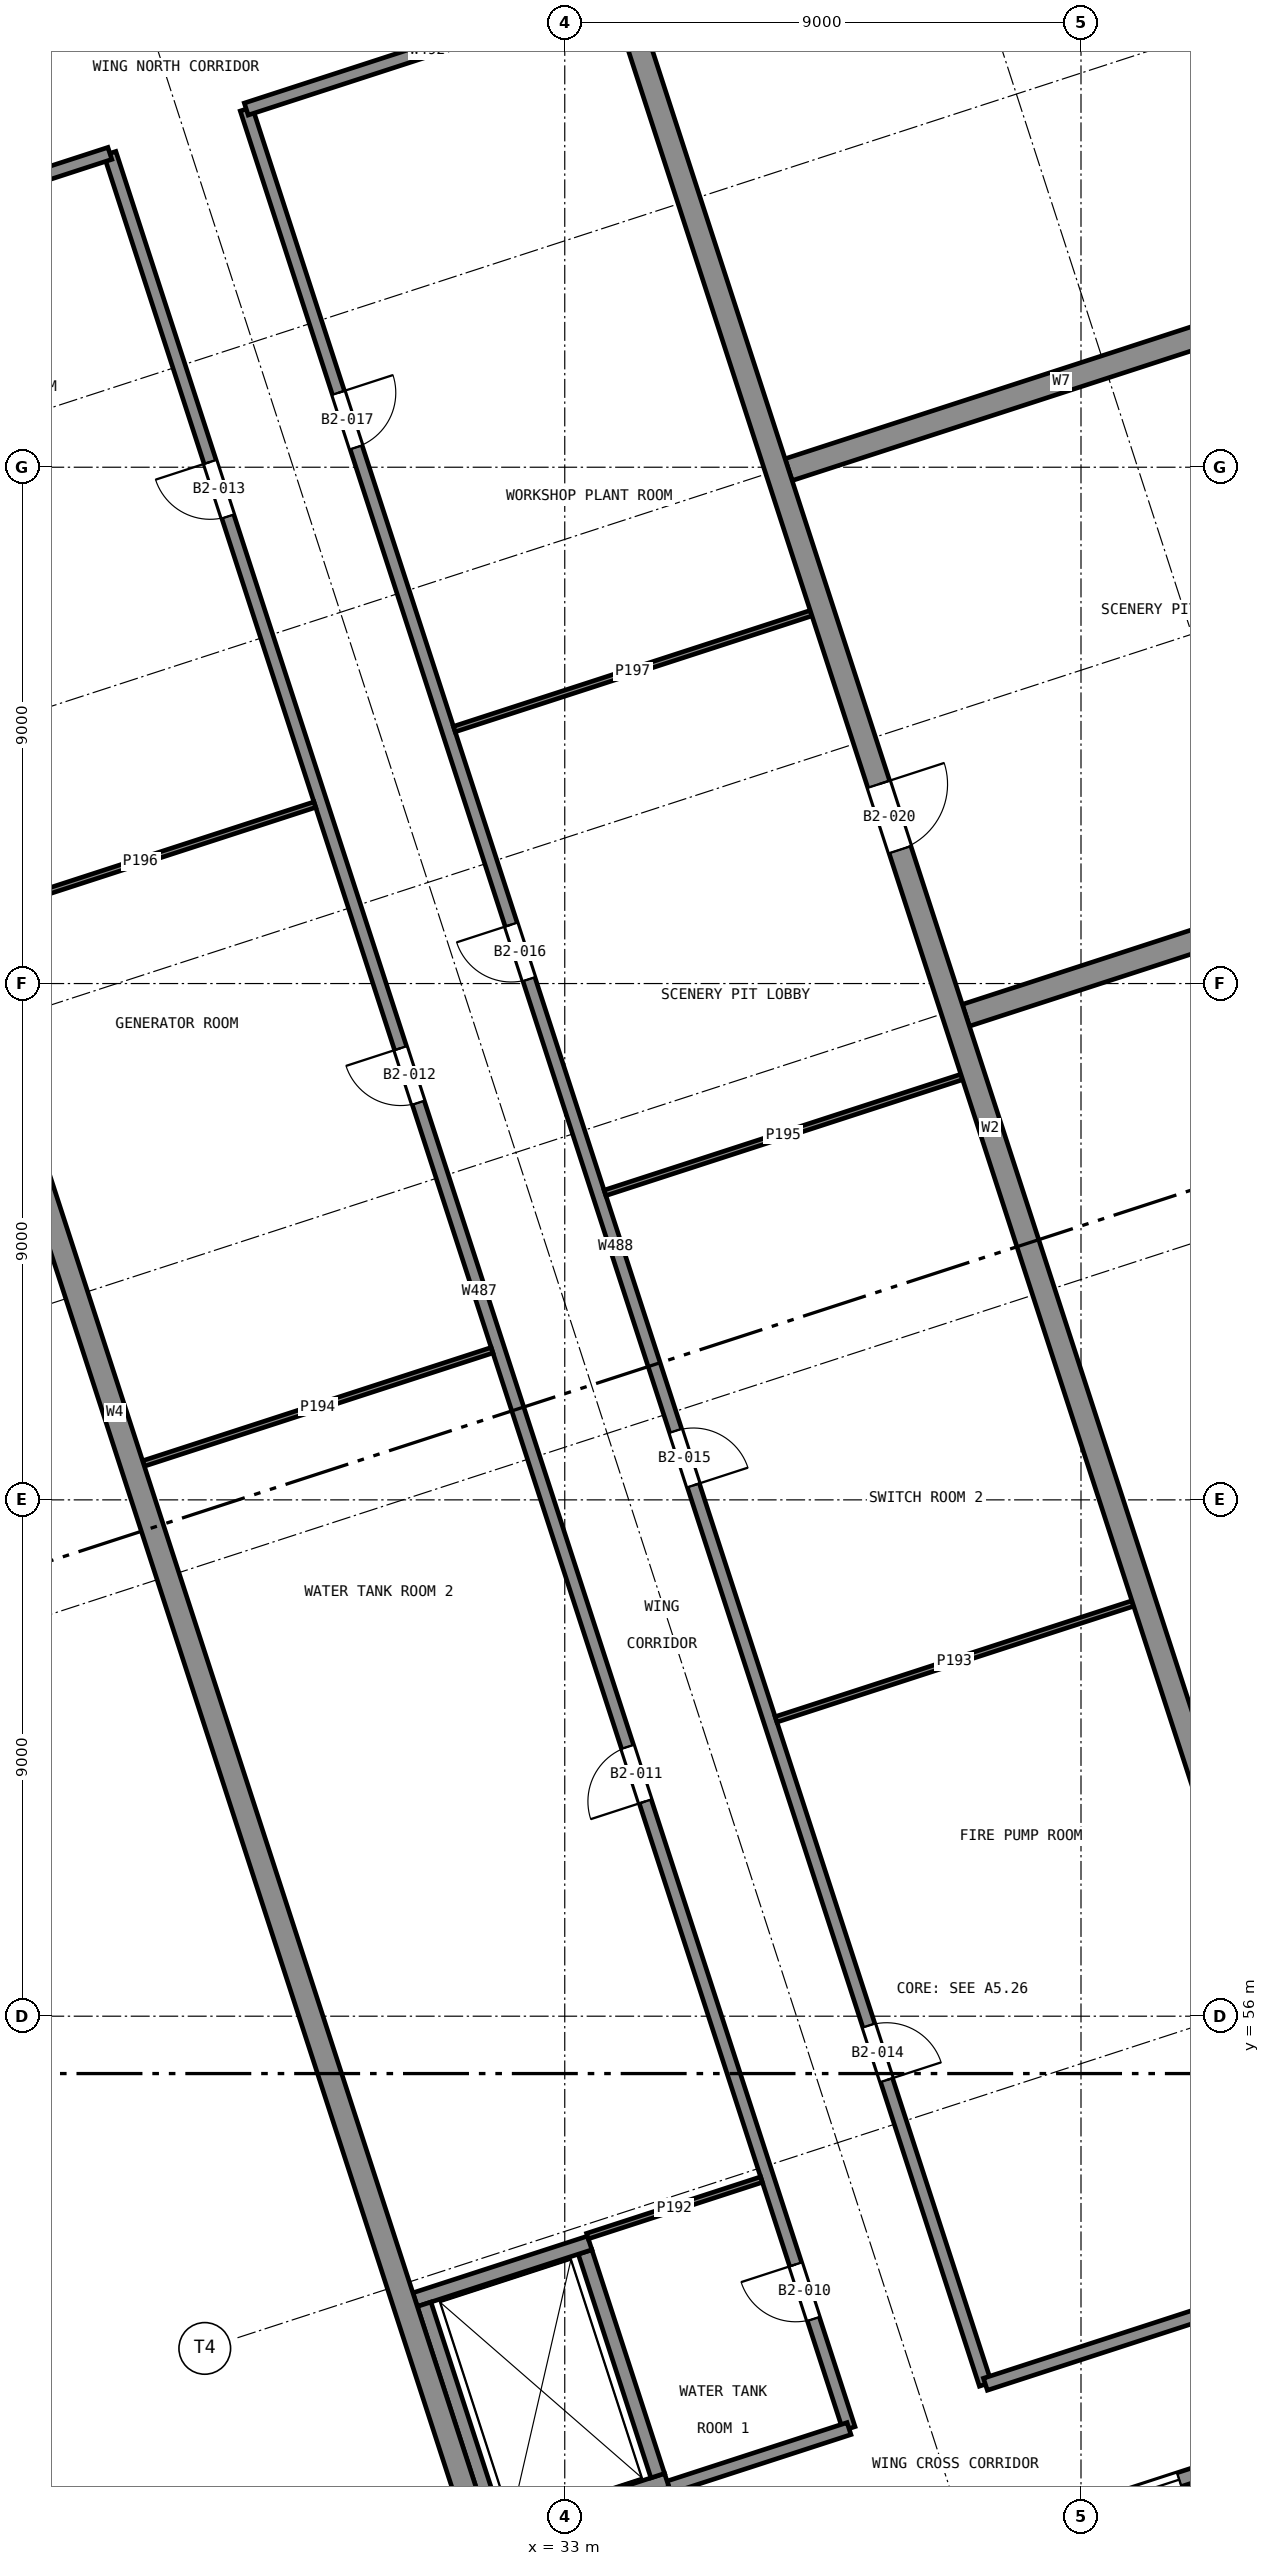
"""IFC4 building model, lengths in metres.
Left out: names, types, materials, properties, quantities, classifications, styles, units other than length and angle.
Written with IfcOpenShell. Run it as: python <this file> out.ifc"""

import sys

from ifc_helpers import new_model, si_unit, direction, frame, frame_2d, origin, place, context, subcontext, project, spatial, rectangle, extrude, element, fill, save


model = new_model("IFC4")
c1 = context("Model", 3, precision=1e-05, world=origin(), true_north=direction((0.0, 1.0)))
c2 = subcontext(c1, "Body", "Model", "MODEL_VIEW")
j1 = project(units=[si_unit("LENGTHUNIT", "METRE"), si_unit("PLANEANGLEUNIT", "RADIAN")], contexts=[c1])
p1 = place(None, origin())
s1 = spatial("IfcSite", under=j1, at=p1, CompositionType="ELEMENT")
p2 = place(p1, origin())
s2 = spatial("IfcBuilding", under=s1, at=p2, CompositionType="ELEMENT")
p3 = place(p2, frame((0.0, 0.0, -10.0)))
s3 = spatial("IfcBuildingStorey", under=s2, at=p3, CompositionType="ELEMENT", Elevation=-10.0)
p4 = place(p3, frame((48.702, 45.994, 0.0), z_axis=(0.0, 0.0, 1.0), x_axis=(-0.309016036191, 0.951056827627, 0.0)))
e1 = element("IfcWall", 1, at=p4, inside=s3, PredefinedType="SOLIDWALL", context=c2, shape_type="SweptSolid", body=[
    extrude(rectangle(XDim=53.6, YDim=0.4, at=frame_2d((26.8, 0.0))), origin(), (0.0, 0.0, 1.0), 5.0),
])
p5 = place(p4, frame((31.9, 0.0, 0.0)))
e2 = element("IfcOpeningElement", 2, at=p5, cuts=e1, PredefinedType="OPENING", context=c2, shape_type="SweptSolid", body=[
    extrude(rectangle(XDim=1.2, YDim=2.1, at=frame_2d((0.6, 1.05))), frame((0.0, 0.21, 0.0), z_axis=(0.0, -1.0, 0.0), x_axis=(1.0, 0.0, 0.0)), (0.0, 0.0, 1.0), 0.42),
])
p6 = place(p3, frame((16.874, 92.011, 0.0), z_axis=(0.0, 0.0, 1.0), x_axis=(0.309020156104, -0.951055488981, 0.0)))
e3 = element("IfcWall", 3, at=p6, inside=s3, PredefinedType="SOLIDWALL", context=c2, shape_type="SweptSolid", body=[
    extrude(rectangle(XDim=53.6, YDim=0.4, at=frame_2d((26.8, 0.0))), origin(), (0.0, 0.0, 1.0), 5.0),
])
for number, where, z_axis, x_axis in (
    (4, (39.993, 73.447, 0.0), (0.0, 0.0, 1.0), (0.951, 0.309, 0.0)),
    (5, (46.413, 86.047, 0.0), (0.0, 0.0, 1.0), (-0.951, -0.309, 0.0)),
):
    element("IfcWall", number, at=place(p3, frame(where, z_axis=z_axis, x_axis=x_axis)), inside=s3, PredefinedType="SOLIDWALL", context=c2, shape_type="SweptSolid", body=[
        extrude(rectangle(XDim=10.0, YDim=0.4, at=frame_2d((5.0, 0.0))), origin(), (0.0, 0.0, 1.0), 5.0),
    ])
p7 = place(p3, frame((27.181, 91.68, 0.0), z_axis=(0.0, 0.0, 1.0), x_axis=(-0.951051301895, -0.309033042189, 0.0)))
e6 = element("IfcWall", 6, at=p7, inside=s3, PredefinedType="SOLIDWALL", context=c2, shape_type="SweptSolid", body=[
    extrude(rectangle(XDim=6.35, YDim=0.3, at=frame_2d((3.175, 0.0))), origin(), (0.0, 0.0, 1.0), 4.65),
])
p8 = place(p7, frame((4.85, 0.0, 0.0)))
e7 = element("IfcOpeningElement", 7, at=p8, cuts=e6, PredefinedType="OPENING", context=c2, shape_type="SweptSolid", body=[
    extrude(rectangle(XDim=1.0, YDim=2.1, at=frame_2d((0.5, 1.05))), frame((0.0, 0.16, 0.0), z_axis=(0.0, -1.0, 0.0), x_axis=(1.0, 0.0, 0.0)), (0.0, 0.0, 1.0), 0.32),
])
p9 = place(p3, frame((44.568, 48.2, -1.5), z_axis=(0.0, 0.0, 1.0), x_axis=(-0.951047059821, -0.309046096893, 0.0)))
e8 = element("IfcWall", 8, at=p9, inside=s3, PredefinedType="SHEAR", context=c2, shape_type="SweptSolid", body=[
    extrude(rectangle(XDim=2.9, YDim=0.25, at=frame_2d((1.45, 0.0))), origin(), (0.0, 0.0, 1.0), 6.5),
])
p10 = place(p9, frame((0.9, 0.0, 1.5)))
e9 = element("IfcOpeningElement", 9, at=p10, cuts=e8, PredefinedType="OPENING", context=c2, shape_type="SweptSolid", body=[
    extrude(rectangle(XDim=1.1, YDim=2.1, at=frame_2d((0.55, 1.05))), frame((0.0, 0.135, 0.0), z_axis=(0.0, -1.0, 0.0), x_axis=(1.0, 0.0, 0.0)), (0.0, 0.0, 1.0), 0.27),
])
p11 = place(p3, frame((31.735, 46.922, -1.5), z_axis=(0.0, 0.0, 1.0), x_axis=(0.95104415986, 0.309055020985, 0.0)))
e10 = element("IfcWall", 10, at=p11, inside=s3, PredefinedType="SHEAR", context=c2, shape_type="SweptSolid", body=[
    extrude(rectangle(XDim=3.2, YDim=0.25, at=frame_2d((1.6, 0.0))), origin(), (0.0, 0.0, 1.0), 6.5),
])
p12 = place(p11, frame((1.05, 0.0, 1.5)))
e11 = element("IfcOpeningElement", 11, at=p12, cuts=e10, PredefinedType="OPENING", context=c2, shape_type="SweptSolid", body=[
    extrude(rectangle(XDim=1.1, YDim=2.1, at=frame_2d((0.55, 1.05))), frame((0.0, 0.135, 0.0), z_axis=(0.0, -1.0, 0.0), x_axis=(1.0, 0.0, 0.0)), (0.0, 0.0, 1.0), 0.27),
])
p13 = place(p3, frame((34.621, 47.991, -1.5), z_axis=(0.0, 0.0, 1.0), x_axis=(-0.309055103076, 0.951044133184, 0.0)))
e12 = element("IfcWall", 12, at=p13, inside=s3, PredefinedType="SHEAR", context=c2, shape_type="SweptSolid", body=[
    extrude(rectangle(XDim=4.1, YDim=0.25, at=frame_2d((2.05, 0.0))), origin(), (0.0, 0.0, 1.0), 6.5),
])
p14 = place(p3, frame((33.434, 52.048, -1.5), z_axis=(0.0, 0.0, 1.0), x_axis=(-0.951066581729, -0.308986014439, 0.0)))
e13 = element("IfcWall", 13, at=p14, inside=s3, PredefinedType="SHEAR", context=c2, shape_type="SweptSolid", body=[
    extrude(rectangle(XDim=3.2, YDim=0.25, at=frame_2d((1.6, 0.0))), origin(), (0.0, 0.0, 1.0), 6.5),
])
p15 = place(p3, frame((30.548, 50.979, -1.5), z_axis=(0.0, 0.0, 1.0), x_axis=(0.309055103076, -0.951044133184, 0.0)))
e14 = element("IfcWall", 14, at=p15, inside=s3, PredefinedType="SHEAR", context=c2, shape_type="SweptSolid", body=[
    extrude(rectangle(XDim=4.1, YDim=0.25, at=frame_2d((2.05, 0.0))), origin(), (0.0, 0.0, 1.0), 6.5),
])
p16 = place(p3, frame((37.956, 48.812, 0.0), z_axis=(0.0, 0.0, 1.0), x_axis=(-0.30901736393, 0.951056396219, 0.0)))
e15 = element("IfcWall", 15, at=p16, inside=s3, PredefinedType="SOLIDWALL", context=c2, shape_type="SweptSolid", body=[
    extrude(rectangle(XDim=41.7, YDim=0.22, at=frame_2d((20.85, 0.0))), origin(), (0.0, 0.0, 1.0), 4.65),
])
p17 = place(p16, frame((2.009, 0.0, 0.0)))
e16 = element("IfcOpeningElement", 16, at=p17, cuts=e15, PredefinedType="OPENING", context=c2, shape_type="SweptSolid", body=[
    extrude(rectangle(XDim=1.0, YDim=2.1, at=frame_2d((0.5, 1.05))), frame((0.0, 0.12, 0.0), z_axis=(0.0, -1.0, 0.0), x_axis=(1.0, 0.0, 0.0)), (0.0, 0.0, 1.0), 0.24),
])
p18 = place(p16, frame((11.495, 0.0, 0.0)))
e17 = element("IfcOpeningElement", 17, at=p18, cuts=e15, PredefinedType="OPENING", context=c2, shape_type="SweptSolid", body=[
    extrude(rectangle(XDim=1.0, YDim=2.1, at=frame_2d((0.5, 1.05))), frame((0.0, 0.12, 0.0), z_axis=(0.0, -1.0, 0.0), x_axis=(1.0, 0.0, 0.0)), (0.0, 0.0, 1.0), 0.24),
])
p19 = place(p16, frame((24.3, 0.0, 0.0)))
e18 = element("IfcOpeningElement", 18, at=p19, cuts=e15, PredefinedType="OPENING", context=c2, shape_type="SweptSolid", body=[
    extrude(rectangle(XDim=1.0, YDim=2.1, at=frame_2d((0.5, 1.05))), frame((0.0, 0.12, 0.0), z_axis=(0.0, -1.0, 0.0), x_axis=(1.0, 0.0, 0.0)), (0.0, 0.0, 1.0), 0.24),
])
p20 = place(p16, frame((35.045, 0.0, 0.0)))
e19 = element("IfcOpeningElement", 19, at=p20, cuts=e15, PredefinedType="OPENING", context=c2, shape_type="SweptSolid", body=[
    extrude(rectangle(XDim=1.0, YDim=2.1, at=frame_2d((0.5, 1.05))), frame((0.0, 0.12, 0.0), z_axis=(0.0, -1.0, 0.0), x_axis=(1.0, 0.0, 0.0)), (0.0, 0.0, 1.0), 0.24),
])
p21 = place(p3, frame((40.333, 49.584, 0.0), z_axis=(0.0, 0.0, 1.0), x_axis=(-0.309015643281, 0.951056955291, 0.0)))
e20 = element("IfcWall", 20, at=p21, inside=s3, PredefinedType="SOLIDWALL", context=c2, shape_type="SweptSolid", body=[
    extrude(rectangle(XDim=41.7, YDim=0.22, at=frame_2d((20.85, 0.0))), origin(), (0.0, 0.0, 1.0), 4.65),
])
p22 = place(p21, frame((5.575, 0.0, 0.0)))
e21 = element("IfcOpeningElement", 21, at=p22, cuts=e20, PredefinedType="OPENING", context=c2, shape_type="SweptSolid", body=[
    extrude(rectangle(XDim=1.0, YDim=2.1, at=frame_2d((0.5, 1.05))), frame((0.0, 0.12, 0.0), z_axis=(0.0, -1.0, 0.0), x_axis=(1.0, 0.0, 0.0)), (0.0, 0.0, 1.0), 0.24),
])
p23 = place(p21, frame((16.475, 0.0, 0.0)))
e22 = element("IfcOpeningElement", 22, at=p23, cuts=e20, PredefinedType="OPENING", context=c2, shape_type="SweptSolid", body=[
    extrude(rectangle(XDim=1.0, YDim=2.1, at=frame_2d((0.5, 1.05))), frame((0.0, 0.12, 0.0), z_axis=(0.0, -1.0, 0.0), x_axis=(1.0, 0.0, 0.0)), (0.0, 0.0, 1.0), 0.24),
])
p24 = place(p21, frame((25.752, 0.0, 0.0)))
e23 = element("IfcOpeningElement", 23, at=p24, cuts=e20, PredefinedType="OPENING", context=c2, shape_type="SweptSolid", body=[
    extrude(rectangle(XDim=1.0, YDim=2.1, at=frame_2d((0.5, 1.05))), frame((0.0, 0.12, 0.0), z_axis=(0.0, -1.0, 0.0), x_axis=(1.0, 0.0, 0.0)), (0.0, 0.0, 1.0), 0.24),
])
p25 = place(p21, frame((35.5, 0.0, 0.0)))
e24 = element("IfcOpeningElement", 24, at=p25, cuts=e20, PredefinedType="OPENING", context=c2, shape_type="SweptSolid", body=[
    extrude(rectangle(XDim=1.0, YDim=2.1, at=frame_2d((0.5, 1.05))), frame((0.0, 0.12, 0.0), z_axis=(0.0, -1.0, 0.0), x_axis=(1.0, 0.0, 0.0)), (0.0, 0.0, 1.0), 0.24),
])
p26 = place(p3, frame((34.817, 47.792, 0.0), z_axis=(0.0, 0.0, 1.0), x_axis=(0.951053095941, 0.309027520945, 0.0)))
e25 = element("IfcWall", 25, at=p26, inside=s3, PredefinedType="SOLIDWALL", context=c2, shape_type="SweptSolid", body=[
    extrude(rectangle(XDim=3.3, YDim=0.22, at=frame_2d((1.65, 0.0))), origin(), (0.0, 0.0, 1.0), 4.65),
])
p27 = place(p3, frame((40.333, 49.584, 0.0), z_axis=(0.0, 0.0, 1.0), x_axis=(0.95105699893, 0.309015508975, 0.0)))
e26 = element("IfcWall", 26, at=p27, inside=s3, PredefinedType="SOLIDWALL", context=c2, shape_type="SweptSolid", body=[
    extrude(rectangle(XDim=6.65, YDim=0.22, at=frame_2d((3.325, 0.0))), origin(), (0.0, 0.0, 1.0), 4.65),
])
p28 = place(p3, frame((18.888, 86.462, 0.0), z_axis=(0.0, 0.0, 1.0), x_axis=(0.951059735424, 0.30900708674, 0.0)))
e27 = element("IfcWall", 27, at=p28, inside=s3, PredefinedType="SOLIDWALL", context=c2, shape_type="SweptSolid", body=[
    extrude(rectangle(XDim=6.5, YDim=0.22, at=frame_2d((3.25, 0.0))), origin(), (0.0, 0.0, 1.0), 4.65),
])
p29 = place(p3, frame((27.447, 89.243, 0.0), z_axis=(0.0, 0.0, 1.0), x_axis=(0.95105699893, 0.309015508975, 0.0)))
e28 = element("IfcWall", 28, at=p29, inside=s3, PredefinedType="SOLIDWALL", context=c2, shape_type="SweptSolid", body=[
    extrude(rectangle(XDim=6.65, YDim=0.22, at=frame_2d((3.325, 0.0))), origin(), (0.0, 0.0, 1.0), 4.65),
])
p30 = place(p3, frame((33.396, 52.167, 0.0), z_axis=(0.0, 0.0, 1.0), x_axis=(0.951044192343, 0.309054921027, 0.0)))
e29 = element("IfcWall", 29, at=p30, inside=s3, PredefinedType="PARTITIONING", context=c2, shape_type="SweptSolid", body=[
    extrude(rectangle(XDim=3.19, YDim=0.1, at=frame_2d((1.595, 0.0))), origin(), (0.0, 0.0, 1.0), 4.65),
])
p31 = place(p3, frame((36.683, 61.173, 0.0), z_axis=(0.0, 0.0, 1.0), x_axis=(0.951056287011, 0.309017700038, 0.0)))
e30 = element("IfcWall", 30, at=p31, inside=s3, PredefinedType="PARTITIONING", context=c2, shape_type="SweptSolid", body=[
    extrude(rectangle(XDim=6.54, YDim=0.1, at=frame_2d((3.27, 0.0))), origin(), (0.0, 0.0, 1.0), 4.65),
])
p32 = place(p3, frame((25.655, 65.634, 0.0), z_axis=(0.0, 0.0, 1.0), x_axis=(0.951055405517, 0.309020412977, 0.0)))
e31 = element("IfcWall", 31, at=p32, inside=s3, PredefinedType="PARTITIONING", context=c2, shape_type="SweptSolid", body=[
    extrude(rectangle(XDim=6.39, YDim=0.1, at=frame_2d((3.195, 0.0))), origin(), (0.0, 0.0, 1.0), 4.65),
])
p33 = place(p3, frame((33.701, 70.351, 0.0), z_axis=(0.0, 0.0, 1.0), x_axis=(0.951052722107, 0.30902867144, 0.0)))
e32 = element("IfcWall", 32, at=p33, inside=s3, PredefinedType="PARTITIONING", context=c2, shape_type="SweptSolid", body=[
    extrude(rectangle(XDim=6.54, YDim=0.1, at=frame_2d((3.27, 0.0))), origin(), (0.0, 0.0, 1.0), 4.65),
])
p34 = place(p3, frame((22.565, 75.144, 0.0), z_axis=(0.0, 0.0, 1.0), x_axis=(0.951055405517, 0.309020412977, 0.0)))
e33 = element("IfcWall", 33, at=p34, inside=s3, PredefinedType="PARTITIONING", context=c2, shape_type="SweptSolid", body=[
    extrude(rectangle(XDim=6.39, YDim=0.1, at=frame_2d((3.195, 0.0))), origin(), (0.0, 0.0, 1.0), 4.65),
])
p35 = place(p3, frame((31.075, 78.435, 0.0), z_axis=(0.0, 0.0, 1.0), x_axis=(0.951056287011, 0.309017700038, 0.0)))
e34 = element("IfcWall", 34, at=p35, inside=s3, PredefinedType="PARTITIONING", context=c2, shape_type="SweptSolid", body=[
    extrude(rectangle(XDim=6.54, YDim=0.1, at=frame_2d((3.27, 0.0))), origin(), (0.0, 0.0, 1.0), 4.65),
])
p36 = place(p10, origin())
e35 = element("IfcDoor", 35, at=p36, inside=s3, OperationType="SLIDING_TO_LEFT", PredefinedType="DOOR", context=c2, shape_type="SweptSolid", body=[
    extrude(rectangle(XDim=1.1, YDim=2.1, at=frame_2d((0.55, 1.05))), frame((0.0, 0.025, 0.0), z_axis=(0.0, -1.0, 0.0), x_axis=(1.0, 0.0, 0.0)), (0.0, 0.0, 1.0), 0.05),
])
fill(e9, e35)
p37 = place(p17, origin())
e36 = element("IfcDoor", 36, at=p37, inside=s3, OperationType="SINGLE_SWING_LEFT", PredefinedType="DOOR", context=c2, shape_type="SweptSolid", body=[
    extrude(rectangle(XDim=1.0, YDim=2.1, at=frame_2d((0.5, 1.05))), frame((0.0, 0.025, 0.0), z_axis=(0.0, -1.0, 0.0), x_axis=(1.0, 0.0, 0.0)), (0.0, 0.0, 1.0), 0.05),
])
fill(e16, e36)
p38 = place(p18, origin())
e37 = element("IfcDoor", 37, at=p38, inside=s3, OperationType="SINGLE_SWING_RIGHT", PredefinedType="DOOR", context=c2, shape_type="SweptSolid", body=[
    extrude(rectangle(XDim=1.0, YDim=2.1, at=frame_2d((0.5, 1.05))), frame((0.0, 0.025, 0.0), z_axis=(0.0, -1.0, 0.0), x_axis=(1.0, 0.0, 0.0)), (0.0, 0.0, 1.0), 0.05),
])
fill(e17, e37)
p39 = place(p19, origin())
e38 = element("IfcDoor", 38, at=p39, inside=s3, OperationType="SINGLE_SWING_LEFT", PredefinedType="DOOR", context=c2, shape_type="SweptSolid", body=[
    extrude(rectangle(XDim=1.0, YDim=2.1, at=frame_2d((0.5, 1.05))), frame((0.0, 0.025, 0.0), z_axis=(0.0, -1.0, 0.0), x_axis=(1.0, 0.0, 0.0)), (0.0, 0.0, 1.0), 0.05),
])
fill(e18, e38)
p40 = place(p20, origin())
e39 = element("IfcDoor", 39, at=p40, inside=s3, OperationType="SINGLE_SWING_LEFT", PredefinedType="DOOR", context=c2, shape_type="SweptSolid", body=[
    extrude(rectangle(XDim=1.0, YDim=2.1, at=frame_2d((0.5, 1.05))), frame((0.0, 0.025, 0.0), z_axis=(0.0, -1.0, 0.0), x_axis=(1.0, 0.0, 0.0)), (0.0, 0.0, 1.0), 0.05),
])
fill(e19, e39)
p41 = place(p22, frame((1.0, 0.0, 0.0), z_axis=(0.0, 0.0, 1.0), x_axis=(-1.0, 0.0, 0.0)))
e40 = element("IfcDoor", 40, at=p41, inside=s3, OperationType="SINGLE_SWING_LEFT", PredefinedType="DOOR", context=c2, shape_type="SweptSolid", body=[
    extrude(rectangle(XDim=1.0, YDim=2.1, at=frame_2d((0.5, 1.05))), frame((0.0, 0.025, 0.0), z_axis=(0.0, -1.0, 0.0), x_axis=(1.0, 0.0, 0.0)), (0.0, 0.0, 1.0), 0.05),
])
fill(e21, e40)
p42 = place(p23, frame((1.0, 0.0, 0.0), z_axis=(0.0, 0.0, 1.0), x_axis=(-1.0, 0.0, 0.0)))
e41 = element("IfcDoor", 41, at=p42, inside=s3, OperationType="SINGLE_SWING_LEFT", PredefinedType="DOOR", context=c2, shape_type="SweptSolid", body=[
    extrude(rectangle(XDim=1.0, YDim=2.1, at=frame_2d((0.5, 1.05))), frame((0.0, 0.025, 0.0), z_axis=(0.0, -1.0, 0.0), x_axis=(1.0, 0.0, 0.0)), (0.0, 0.0, 1.0), 0.05),
])
fill(e22, e41)
p43 = place(p24, origin())
e42 = element("IfcDoor", 42, at=p43, inside=s3, OperationType="SINGLE_SWING_LEFT", PredefinedType="DOOR", context=c2, shape_type="SweptSolid", body=[
    extrude(rectangle(XDim=1.0, YDim=2.1, at=frame_2d((0.5, 1.05))), frame((0.0, 0.025, 0.0), z_axis=(0.0, -1.0, 0.0), x_axis=(1.0, 0.0, 0.0)), (0.0, 0.0, 1.0), 0.05),
])
fill(e23, e42)
p44 = place(p25, frame((1.0, 0.0, 0.0), z_axis=(0.0, 0.0, 1.0), x_axis=(-1.0, 0.0, 0.0)))
e43 = element("IfcDoor", 43, at=p44, inside=s3, OperationType="SINGLE_SWING_RIGHT", PredefinedType="DOOR", context=c2, shape_type="SweptSolid", body=[
    extrude(rectangle(XDim=1.0, YDim=2.1, at=frame_2d((0.5, 1.05))), frame((0.0, 0.025, 0.0), z_axis=(0.0, -1.0, 0.0), x_axis=(1.0, 0.0, 0.0)), (0.0, 0.0, 1.0), 0.05),
])
fill(e24, e43)
p45 = place(p5, frame((1.2, 0.0, 0.0), z_axis=(0.0, 0.0, 1.0), x_axis=(-1.0, 0.0, 0.0)))
e44 = element("IfcDoor", 44, at=p45, inside=s3, OperationType="SINGLE_SWING_RIGHT", PredefinedType="DOOR", context=c2, shape_type="SweptSolid", body=[
    extrude(rectangle(XDim=1.2, YDim=2.1, at=frame_2d((0.6, 1.05))), frame((0.0, 0.025, 0.0), z_axis=(0.0, -1.0, 0.0), x_axis=(1.0, 0.0, 0.0)), (0.0, 0.0, 1.0), 0.05),
])
fill(e2, e44)
save(model, sys.argv[1])
